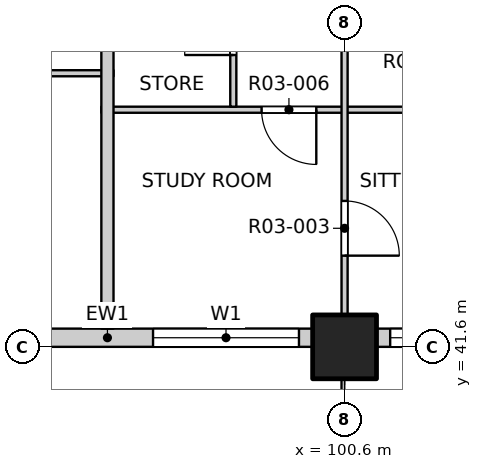
"""IFC4 building model, lengths in metres.
Left out: names, types, materials, properties, quantities, classifications, styles, units other than length and angle.
Written with IfcOpenShell. Run it as: python <this file> out.ifc"""

import sys

from ifc_helpers import new_model, si_unit, direction, frame, frame_2d, origin, origin_2d, place, context, subcontext, project, spatial, rectangle, extrude, element, fill, save


model = new_model("IFC4")
c1 = context("Model", 3, precision=1e-05, world=origin(), true_north=direction((0.0, 1.0)))
c2 = subcontext(c1, "Body", "Model", "MODEL_VIEW")
j1 = project(units=[si_unit("LENGTHUNIT", "METRE"), si_unit("PLANEANGLEUNIT", "RADIAN")], contexts=[c1])
p1 = place(None, origin())
s1 = spatial("IfcSite", under=j1, at=p1, CompositionType="ELEMENT")
p2 = place(p1, origin())
s2 = spatial("IfcBuilding", under=s1, at=p2, CompositionType="ELEMENT")
p3 = place(p2, frame((0.0, 0.0, 43.3)))
s3 = spatial("IfcBuildingStorey", under=s2, at=p3, CompositionType="ELEMENT", Elevation=43.3)
p4 = place(p3, frame((100.6, 41.6, -0.25), z_axis=(0.0, 0.0, 1.0), x_axis=(1.0, 0.0, 0.0)))
e1 = element("IfcColumn", 1, at=p4, inside=s3, PredefinedType="COLUMN", context=c2, shape_type="SweptSolid", body=[
    extrude(rectangle(XDim=1.05, YDim=1.05, at=origin_2d()), origin(), (0.0, 0.0, 1.0), 3.35),
])
p5 = place(p3, frame((93.325, 41.75, 0.0), z_axis=(0.0, 0.0, 1.0), x_axis=(1.0, 0.0, 0.0)))
e2 = element("IfcWall", 2, at=p5, inside=s3, PredefinedType="SOLIDWALL", context=c2, shape_type="SweptSolid", body=[
    extrude(rectangle(XDim=6.75, YDim=0.3, at=frame_2d((3.375, 0.0))), origin(), (0.0, 0.0, 1.0), 3.1),
])
p6 = place(p5, frame((0.525, 0.0, 0.0)))
e3 = element("IfcOpeningElement", 3, at=p6, cuts=e2, PredefinedType="OPENING", context=c2, shape_type="SweptSolid", body=[
    extrude(rectangle(XDim=1.8, YDim=2.4, at=frame_2d((0.9, 1.2))), frame((0.0, 0.16, 0.0), z_axis=(0.0, -1.0, 0.0), x_axis=(1.0, 0.0, 0.0)), (0.0, 0.0, 1.0), 0.32),
])
p7 = place(p5, frame((4.125, 0.0, 0.9)))
e4 = element("IfcOpeningElement", 4, at=p7, cuts=e2, PredefinedType="OPENING", context=c2, shape_type="SweptSolid", body=[
    extrude(rectangle(XDim=2.4, YDim=1.8, at=frame_2d((1.2, 0.9))), frame((0.0, 0.16, 0.0), z_axis=(0.0, -1.0, 0.0), x_axis=(1.0, 0.0, 0.0)), (0.0, 0.0, 1.0), 0.32),
])
p8 = place(p3, frame((101.125, 41.75, 0.0), z_axis=(0.0, 0.0, 1.0), x_axis=(1.0, 0.0, 0.0)))
e5 = element("IfcWall", 5, at=p8, inside=s3, PredefinedType="SOLIDWALL", context=c2, shape_type="SweptSolid", body=[
    extrude(rectangle(XDim=3.375, YDim=0.3, at=frame_2d((1.688, 0.0))), origin(), (0.0, 0.0, 1.0), 3.1),
])
p9 = place(p8, frame((0.225, 0.0, 0.9)))
e6 = element("IfcOpeningElement", 6, at=p9, cuts=e5, PredefinedType="OPENING", context=c2, shape_type="SweptSolid", body=[
    extrude(rectangle(XDim=2.4, YDim=1.8, at=frame_2d((1.2, 0.9))), frame((0.0, 0.16, 0.0), z_axis=(0.0, -1.0, 0.0), x_axis=(1.0, 0.0, 0.0)), (0.0, 0.0, 1.0), 0.32),
])
p10 = place(p3, frame((96.6, 45.5, 0.0), z_axis=(0.0, 0.0, 1.0), x_axis=(1.0, 0.0, 0.0)))
e7 = element("IfcWall", 7, at=p10, inside=s3, PredefinedType="PARTITIONING", context=c2, shape_type="SweptSolid", body=[
    extrude(rectangle(XDim=11.5, YDim=0.1, at=frame_2d((5.75, 0.0))), origin(), (0.0, 0.0, 1.0), 3.1),
])
p11 = place(p10, frame((2.635, 0.0, 0.0)))
e8 = element("IfcOpeningElement", 8, at=p11, cuts=e7, PredefinedType="OPENING", context=c2, shape_type="SweptSolid", body=[
    extrude(rectangle(XDim=0.9, YDim=2.1, at=frame_2d((0.45, 1.05))), frame((0.0, 0.06, 0.0), z_axis=(0.0, -1.0, 0.0), x_axis=(1.0, 0.0, 0.0)), (0.0, 0.0, 1.0), 0.12),
])
p12 = place(p3, frame((88.8, 46.1, 0.0), z_axis=(0.0, 0.0, 1.0), x_axis=(1.0, 0.0, 0.0)))
e9 = element("IfcWall", 9, at=p12, inside=s3, PredefinedType="PARTITIONING", context=c2, shape_type="SweptSolid", body=[
    extrude(rectangle(XDim=8.0, YDim=0.1, at=frame_2d((4.0, 0.0))), origin(), (0.0, 0.0, 1.0), 3.1),
])
p13 = place(p12, frame((0.625, 0.0, 0.0)))
e10 = element("IfcOpeningElement", 10, at=p13, cuts=e9, PredefinedType="OPENING", context=c2, shape_type="SweptSolid", body=[
    extrude(rectangle(XDim=0.9, YDim=2.1, at=frame_2d((0.45, 1.05))), frame((0.0, 0.06, 0.0), z_axis=(0.0, -1.0, 0.0), x_axis=(1.0, 0.0, 0.0)), (0.0, 0.0, 1.0), 0.12),
])
p14 = place(p12, frame((2.575, 0.0, 0.0)))
e11 = element("IfcOpeningElement", 11, at=p14, cuts=e9, PredefinedType="OPENING", context=c2, shape_type="SweptSolid", body=[
    extrude(rectangle(XDim=0.9, YDim=2.1, at=frame_2d((0.45, 1.05))), frame((0.0, 0.06, 0.0), z_axis=(0.0, -1.0, 0.0), x_axis=(1.0, 0.0, 0.0)), (0.0, 0.0, 1.0), 0.12),
])
p15 = place(p12, frame((5.35, 0.0, 0.0)))
e12 = element("IfcOpeningElement", 12, at=p15, cuts=e9, PredefinedType="OPENING", context=c2, shape_type="SweptSolid", body=[
    extrude(rectangle(XDim=1.2, YDim=2.1, at=frame_2d((0.6, 1.05))), frame((0.0, 0.06, 0.0), z_axis=(0.0, -1.0, 0.0), x_axis=(1.0, 0.0, 0.0)), (0.0, 0.0, 1.0), 0.12),
])
p16 = place(p3, frame((96.7, 41.9, 0.0), z_axis=(0.0, 0.0, 1.0), x_axis=(0.0, 1.0, 0.0)))
e13 = element("IfcWall", 13, at=p16, inside=s3, PredefinedType="PARTITIONING", context=c2, shape_type="SweptSolid", body=[
    extrude(rectangle(XDim=11.3, YDim=0.2, at=frame_2d((5.65, 0.0))), origin(), (0.0, 0.0, 1.0), 3.1),
])
p17 = place(p3, frame((98.77, 45.55, 0.0), z_axis=(0.0, 0.0, 1.0), x_axis=(0.0, 1.0, 0.0)))
e14 = element("IfcWall", 14, at=p17, inside=s3, PredefinedType="PARTITIONING", context=c2, shape_type="SweptSolid", body=[
    extrude(rectangle(XDim=9.85, YDim=0.1, at=frame_2d((4.925, 0.0))), origin(), (0.0, 0.0, 1.0), 3.1),
])
p18 = place(p17, frame((0.85, 0.0, 0.0)))
e15 = element("IfcOpeningElement", 15, at=p18, cuts=e14, PredefinedType="OPENING", context=c2, shape_type="SweptSolid", body=[
    extrude(rectangle(XDim=0.8, YDim=2.1, at=frame_2d((0.4, 1.05))), frame((0.0, 0.06, 0.0), z_axis=(0.0, -1.0, 0.0), x_axis=(1.0, 0.0, 0.0)), (0.0, 0.0, 1.0), 0.12),
])
p19 = place(p17, frame((3.3, 0.0, 0.0)))
e16 = element("IfcOpeningElement", 16, at=p19, cuts=e14, PredefinedType="OPENING", context=c2, shape_type="SweptSolid", body=[
    extrude(rectangle(XDim=0.9, YDim=2.1, at=frame_2d((0.45, 1.05))), frame((0.0, 0.06, 0.0), z_axis=(0.0, -1.0, 0.0), x_axis=(1.0, 0.0, 0.0)), (0.0, 0.0, 1.0), 0.12),
])
p20 = place(p17, frame((5.725, 0.0, 0.0)))
e17 = element("IfcOpeningElement", 17, at=p20, cuts=e14, PredefinedType="OPENING", context=c2, shape_type="SweptSolid", body=[
    extrude(rectangle(XDim=0.8, YDim=2.1, at=frame_2d((0.4, 1.05))), frame((0.0, 0.06, 0.0), z_axis=(0.0, -1.0, 0.0), x_axis=(1.0, 0.0, 0.0)), (0.0, 0.0, 1.0), 0.12),
])
p21 = place(p17, frame((8.2, 0.0, 0.0)))
e18 = element("IfcOpeningElement", 18, at=p21, cuts=e14, PredefinedType="OPENING", context=c2, shape_type="SweptSolid", body=[
    extrude(rectangle(XDim=0.8, YDim=2.1, at=frame_2d((0.4, 1.05))), frame((0.0, 0.06, 0.0), z_axis=(0.0, -1.0, 0.0), x_axis=(1.0, 0.0, 0.0)), (0.0, 0.0, 1.0), 0.12),
])
p22 = place(p3, frame((100.6, 41.9, 0.0), z_axis=(0.0, 0.0, 1.0), x_axis=(0.0, 1.0, 0.0)))
e19 = element("IfcWall", 19, at=p22, inside=s3, PredefinedType="PARTITIONING", context=c2, shape_type="SweptSolid", body=[
    extrude(rectangle(XDim=46.2, YDim=0.1, at=frame_2d((23.1, 0.0))), origin(), (0.0, 0.0, 1.0), 3.1),
])
p23 = place(p22, frame((1.2, 0.0, 0.0)))
e20 = element("IfcOpeningElement", 20, at=p23, cuts=e19, PredefinedType="OPENING", context=c2, shape_type="SweptSolid", body=[
    extrude(rectangle(XDim=0.9, YDim=2.1, at=frame_2d((0.45, 1.05))), frame((0.0, 0.06, 0.0), z_axis=(0.0, -1.0, 0.0), x_axis=(1.0, 0.0, 0.0)), (0.0, 0.0, 1.0), 0.12),
])
p24 = place(p22, frame((5.9, 0.0, 0.0)))
e21 = element("IfcOpeningElement", 21, at=p24, cuts=e19, PredefinedType="OPENING", context=c2, shape_type="SweptSolid", body=[
    extrude(rectangle(XDim=0.9, YDim=2.1, at=frame_2d((0.45, 1.05))), frame((0.0, 0.06, 0.0), z_axis=(0.0, -1.0, 0.0), x_axis=(1.0, 0.0, 0.0)), (0.0, 0.0, 1.0), 0.12),
])
p25 = place(p22, frame((9.0, 0.0, 0.0)))
e22 = element("IfcOpeningElement", 22, at=p25, cuts=e19, PredefinedType="OPENING", context=c2, shape_type="SweptSolid", body=[
    extrude(rectangle(XDim=0.9, YDim=2.1, at=frame_2d((0.45, 1.05))), frame((0.0, 0.06, 0.0), z_axis=(0.0, -1.0, 0.0), x_axis=(1.0, 0.0, 0.0)), (0.0, 0.0, 1.0), 0.12),
])
p26 = place(p22, frame((13.725, 0.0, 0.0)))
e23 = element("IfcOpeningElement", 23, at=p26, cuts=e19, PredefinedType="OPENING", context=c2, shape_type="SweptSolid", body=[
    extrude(rectangle(XDim=0.9, YDim=2.1, at=frame_2d((0.45, 1.05))), frame((0.0, 0.06, 0.0), z_axis=(0.0, -1.0, 0.0), x_axis=(1.0, 0.0, 0.0)), (0.0, 0.0, 1.0), 0.12),
])
p27 = place(p22, frame((17.775, 0.0, 0.0)))
e24 = element("IfcOpeningElement", 24, at=p27, cuts=e19, PredefinedType="OPENING", context=c2, shape_type="SweptSolid", body=[
    extrude(rectangle(XDim=0.9, YDim=2.1, at=frame_2d((0.45, 1.05))), frame((0.0, 0.06, 0.0), z_axis=(0.0, -1.0, 0.0), x_axis=(1.0, 0.0, 0.0)), (0.0, 0.0, 1.0), 0.12),
])
p28 = place(p22, frame((21.5, 0.0, 0.0)))
e25 = element("IfcOpeningElement", 25, at=p28, cuts=e19, PredefinedType="OPENING", context=c2, shape_type="SweptSolid", body=[
    extrude(rectangle(XDim=0.9, YDim=2.1, at=frame_2d((0.45, 1.05))), frame((0.0, 0.06, 0.0), z_axis=(0.0, -1.0, 0.0), x_axis=(1.0, 0.0, 0.0)), (0.0, 0.0, 1.0), 0.12),
])
p29 = place(p22, frame((24.6, 0.0, 0.0)))
e26 = element("IfcOpeningElement", 26, at=p29, cuts=e19, PredefinedType="OPENING", context=c2, shape_type="SweptSolid", body=[
    extrude(rectangle(XDim=0.9, YDim=2.1, at=frame_2d((0.45, 1.05))), frame((0.0, 0.06, 0.0), z_axis=(0.0, -1.0, 0.0), x_axis=(1.0, 0.0, 0.0)), (0.0, 0.0, 1.0), 0.12),
])
p30 = place(p22, frame((28.5, 0.0, 0.0)))
e27 = element("IfcOpeningElement", 27, at=p30, cuts=e19, PredefinedType="OPENING", context=c2, shape_type="SweptSolid", body=[
    extrude(rectangle(XDim=0.9, YDim=2.1, at=frame_2d((0.45, 1.05))), frame((0.0, 0.06, 0.0), z_axis=(0.0, -1.0, 0.0), x_axis=(1.0, 0.0, 0.0)), (0.0, 0.0, 1.0), 0.12),
])
p31 = place(p22, frame((33.375, 0.0, 0.0)))
e28 = element("IfcOpeningElement", 28, at=p31, cuts=e19, PredefinedType="OPENING", context=c2, shape_type="SweptSolid", body=[
    extrude(rectangle(XDim=0.9, YDim=2.1, at=frame_2d((0.45, 1.05))), frame((0.0, 0.06, 0.0), z_axis=(0.0, -1.0, 0.0), x_axis=(1.0, 0.0, 0.0)), (0.0, 0.0, 1.0), 0.12),
])
p32 = place(p22, frame((37.1, 0.0, 0.0)))
e29 = element("IfcOpeningElement", 29, at=p32, cuts=e19, PredefinedType="OPENING", context=c2, shape_type="SweptSolid", body=[
    extrude(rectangle(XDim=0.9, YDim=2.1, at=frame_2d((0.45, 1.05))), frame((0.0, 0.06, 0.0), z_axis=(0.0, -1.0, 0.0), x_axis=(1.0, 0.0, 0.0)), (0.0, 0.0, 1.0), 0.12),
])
p33 = place(p22, frame((40.2, 0.0, 0.0)))
e30 = element("IfcOpeningElement", 30, at=p33, cuts=e19, PredefinedType="OPENING", context=c2, shape_type="SweptSolid", body=[
    extrude(rectangle(XDim=0.9, YDim=2.1, at=frame_2d((0.45, 1.05))), frame((0.0, 0.06, 0.0), z_axis=(0.0, -1.0, 0.0), x_axis=(1.0, 0.0, 0.0)), (0.0, 0.0, 1.0), 0.12),
])
p34 = place(p22, frame((44.1, 0.0, 0.0)))
e31 = element("IfcOpeningElement", 31, at=p34, cuts=e19, PredefinedType="OPENING", context=c2, shape_type="SweptSolid", body=[
    extrude(rectangle(XDim=0.9, YDim=2.1, at=frame_2d((0.45, 1.05))), frame((0.0, 0.06, 0.0), z_axis=(0.0, -1.0, 0.0), x_axis=(1.0, 0.0, 0.0)), (0.0, 0.0, 1.0), 0.12),
])
p35 = place(p7, origin())
e32 = element("IfcWindow", 32, at=p35, inside=s3, PartitioningType="DOUBLE_PANEL_VERTICAL", PredefinedType="WINDOW", context=c2, shape_type="SweptSolid", body=[
    extrude(rectangle(XDim=2.4, YDim=1.8, at=frame_2d((1.2, 0.9))), frame((0.0, 0.03, 0.0), z_axis=(0.0, -1.0, 0.0), x_axis=(1.0, 0.0, 0.0)), (0.0, 0.0, 1.0), 0.06),
])
fill(e4, e32)
p36 = place(p9, origin())
e33 = element("IfcWindow", 33, at=p36, inside=s3, PartitioningType="DOUBLE_PANEL_VERTICAL", PredefinedType="WINDOW", context=c2, shape_type="SweptSolid", body=[
    extrude(rectangle(XDim=2.4, YDim=1.8, at=frame_2d((1.2, 0.9))), frame((0.0, 0.03, 0.0), z_axis=(0.0, -1.0, 0.0), x_axis=(1.0, 0.0, 0.0)), (0.0, 0.0, 1.0), 0.06),
])
fill(e6, e33)
p37 = place(p23, origin())
e34 = element("IfcDoor", 34, at=p37, inside=s3, OperationType="SINGLE_SWING_RIGHT", PredefinedType="DOOR", context=c2, shape_type="SweptSolid", body=[
    extrude(rectangle(XDim=0.9, YDim=2.1, at=frame_2d((0.45, 1.05))), frame((0.0, 0.025, 0.0), z_axis=(0.0, -1.0, 0.0), x_axis=(1.0, 0.0, 0.0)), (0.0, 0.0, 1.0), 0.05),
])
fill(e20, e34)
p38 = place(p11, origin())
e35 = element("IfcDoor", 35, at=p38, inside=s3, OperationType="SINGLE_SWING_LEFT", PredefinedType="DOOR", context=c2, shape_type="SweptSolid", body=[
    extrude(rectangle(XDim=0.9, YDim=2.1, at=frame_2d((0.45, 1.05))), frame((0.0, 0.025, 0.0), z_axis=(0.0, -1.0, 0.0), x_axis=(1.0, 0.0, 0.0)), (0.0, 0.0, 1.0), 0.05),
])
fill(e8, e35)
p39 = place(p18, origin())
e36 = element("IfcDoor", 36, at=p39, inside=s3, OperationType="SINGLE_SWING_LEFT", PredefinedType="DOOR", context=c2, shape_type="SweptSolid", body=[
    extrude(rectangle(XDim=0.8, YDim=2.1, at=frame_2d((0.4, 1.05))), frame((0.0, 0.025, 0.0), z_axis=(0.0, -1.0, 0.0), x_axis=(1.0, 0.0, 0.0)), (0.0, 0.0, 1.0), 0.05),
])
fill(e15, e36)
save(model, sys.argv[1])
